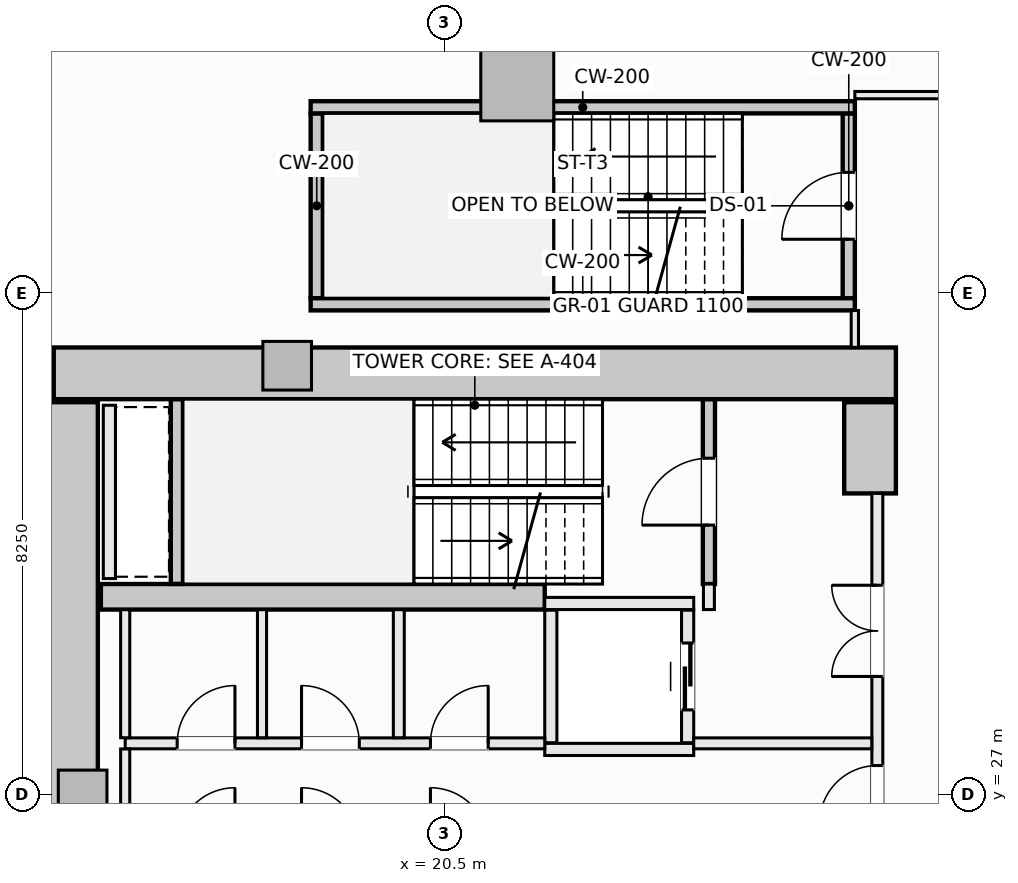
"""IFC4 building model, lengths in metres.
Left out: names, types, materials, properties, quantities, classifications, styles, units other than length and angle.
Written with IfcOpenShell. Run it as: python <this file> out.ifc"""

import sys

from ifc_helpers import new_model, si_unit, direction, frame, frame_2d, origin, origin_2d, place, context, subcontext, project, spatial, rectangle, extrude, element, fill, save


model = new_model("IFC4")
c1 = context("Model", 3, precision=1e-05, world=origin(), true_north=direction((0.0, 1.0)))
c2 = subcontext(c1, "Body", "Model", "MODEL_VIEW")
j1 = project(units=[si_unit("LENGTHUNIT", "METRE"), si_unit("PLANEANGLEUNIT", "RADIAN")], contexts=[c1])
p1 = place(None, origin())
s1 = spatial("IfcSite", under=j1, at=p1, CompositionType="ELEMENT")
p2 = place(p1, origin())
s2 = spatial("IfcBuilding", under=s1, at=p2, CompositionType="ELEMENT")
p3 = place(p2, frame((0.0, 0.0, 49.6)))
s3 = spatial("IfcBuildingStorey", under=s2, at=p3, CompositionType="ELEMENT", Elevation=49.6)
p4 = place(p3, frame((14.075, 33.925, -0.28), z_axis=(0.0, 0.0, 1.0), x_axis=(1.0, 0.0, 0.0)))
e1 = element("IfcWall", 1, at=p4, inside=s3, PredefinedType="SHEAR", context=c2, shape_type="SweptSolid", body=[
    extrude(rectangle(XDim=13.85, YDim=0.85, at=frame_2d((6.925, 0.0))), origin(), (0.0, 0.0, 1.0), 3.85),
])
p5 = place(p3, frame((14.375, 20.55, -0.28), z_axis=(0.0, 0.0, 1.0), x_axis=(0.0, 1.0, 0.0)))
e2 = element("IfcWall", 2, at=p5, inside=s3, PredefinedType="SHEAR", context=c2, shape_type="SweptSolid", body=[
    extrude(rectangle(XDim=12.9, YDim=0.85, at=frame_2d((6.45, 0.0))), origin(), (0.0, 0.0, 1.0), 3.85),
])
p6 = place(p3, frame((27.5, 31.95, -0.28), z_axis=(0.0, 0.0, 1.0), x_axis=(0.0, 1.0, 0.0)))
e3 = element("IfcWall", 3, at=p6, inside=s3, PredefinedType="SHEAR", context=c2, shape_type="SweptSolid", body=[
    extrude(rectangle(XDim=1.5, YDim=0.85, at=frame_2d((0.75, 0.0))), origin(), (0.0, 0.0, 1.0), 3.85),
])
p7 = place(p3, frame((14.85, 30.25, -0.28), z_axis=(0.0, 0.0, 1.0), x_axis=(1.0, 0.0, 0.0)))
e4 = element("IfcWall", 4, at=p7, inside=s3, PredefinedType="SHEAR", context=c2, shape_type="SweptSolid", body=[
    extrude(rectangle(XDim=7.3, YDim=0.42, at=frame_2d((3.65, 0.0))), origin(), (0.0, 0.0, 1.0), 3.85),
])
p8 = place(p3, frame((21.698, 38.677, -0.28), z_axis=(0.0, 0.0, 1.0), x_axis=(1.0, 0.0, 0.0)))
e5 = element("IfcColumn", 5, at=p8, inside=s3, PredefinedType="COLUMN", context=c2, shape_type="SweptSolid", body=[
    extrude(rectangle(XDim=1.2, YDim=1.2, at=origin_2d()), origin(), (0.0, 0.0, 1.0), 3.85),
])
for number, where, z_axis, x_axis in (
    (6, (17.914, 34.05, -0.28), (0.0, 0.0, 1.0), (1.0, 0.0, 0.0)),
    (7, (14.55, 27.0, -0.28), (0.0, 0.0, 1.0), (1.0, 0.0, 0.0)),
):
    element("IfcColumn", number, at=place(p3, frame(where, z_axis=z_axis, x_axis=x_axis)), inside=s3, PredefinedType="PILASTER", context=c2, shape_type="SweptSolid", body=[
        extrude(rectangle(XDim=0.8, YDim=0.8, at=origin_2d()), origin(), (0.0, 0.0, 1.0), 3.85),
    ])
p9 = place(p3, frame((24.85, 30.46, -0.28), z_axis=(0.0, 0.0, 1.0), x_axis=(0.0, 1.0, 0.0)))
e8 = element("IfcWall", 8, at=p9, inside=s3, PredefinedType="SHEAR", context=c2, shape_type="SweptSolid", body=[
    extrude(rectangle(XDim=3.038, YDim=0.2, at=frame_2d((1.519, 0.0))), origin(), (0.0, 0.0, 1.0), 3.85),
])
p10 = place(p9, frame((0.969, 0.0, 0.28)))
e9 = element("IfcOpeningElement", 9, at=p10, cuts=e8, PredefinedType="OPENING", context=c2, shape_type="SweptSolid", body=[
    extrude(rectangle(XDim=1.1, YDim=2.15, at=frame_2d((0.55, 1.075))), frame((0.0, 0.11, 0.0), z_axis=(0.0, -1.0, 0.0), x_axis=(1.0, 0.0, 0.0)), (0.0, 0.0, 1.0), 0.22),
])
p11 = place(p3, frame((16.1, 30.462, -0.28), z_axis=(0.0, 0.0, 1.0), x_axis=(0.0, 1.0, 0.0)))
e10 = element("IfcWall", 10, at=p11, inside=s3, PredefinedType="SHEAR", context=c2, shape_type="SweptSolid", body=[
    extrude(rectangle(XDim=3.036, YDim=0.2, at=frame_2d((1.518, 0.0))), origin(), (0.0, 0.0, 1.0), 3.85),
])
p12 = place(p3, frame((27.15, 35.16, -0.28), z_axis=(0.0, 0.0, 1.0), x_axis=(0.0, 1.0, 0.0)))
e11 = element("IfcWall", 11, at=p12, inside=s3, PredefinedType="SHEAR", context=c2, shape_type="SweptSolid", body=[
    extrude(rectangle(XDim=3.04, YDim=0.2, at=frame_2d((1.52, 0.0))), origin(), (0.0, 0.0, 1.0), 3.85),
])
p13 = place(p12, frame((0.97, 0.0, 0.28)))
e12 = element("IfcOpeningElement", 12, at=p13, cuts=e11, PredefinedType="OPENING", context=c2, shape_type="SweptSolid", body=[
    extrude(rectangle(XDim=1.1, YDim=2.15, at=frame_2d((0.55, 1.075))), frame((0.0, 0.11, 0.0), z_axis=(0.0, -1.0, 0.0), x_axis=(1.0, 0.0, 0.0)), (0.0, 0.0, 1.0), 0.22),
])
p14 = place(p3, frame((18.4, 35.16, -0.28), z_axis=(0.0, 0.0, 1.0), x_axis=(0.0, 1.0, 0.0)))
e13 = element("IfcWall", 13, at=p14, inside=s3, PredefinedType="SHEAR", context=c2, shape_type="SweptSolid", body=[
    extrude(rectangle(XDim=3.04, YDim=0.2, at=frame_2d((1.52, 0.0))), origin(), (0.0, 0.0, 1.0), 3.85),
])
for number, where, z_axis, x_axis in (
    (14, (18.3, 38.3, -0.28), (0.0, 0.0, 1.0), (1.0, 0.0, 0.0)),
    (15, (18.3, 35.06, -0.28), (0.0, 0.0, 1.0), (1.0, 0.0, 0.0)),
):
    element("IfcWall", number, at=place(p3, frame(where, z_axis=z_axis, x_axis=x_axis)), inside=s3, PredefinedType="SHEAR", context=c2, shape_type="SweptSolid", body=[
        extrude(rectangle(XDim=8.95, YDim=0.2, at=frame_2d((4.475, 0.0))), origin(), (0.0, 0.0, 1.0), 3.85),
    ])
for number, where, z_axis, x_axis in (
    (16, (22.15, 30.14, 0.0), (0.0, 0.0, 1.0), (1.0, 0.0, 0.0)),
    (17, (22.15, 27.74, 0.0), (0.0, 0.0, 1.0), (1.0, 0.0, 0.0)),
):
    element("IfcWall", number, at=place(p3, frame(where, z_axis=z_axis, x_axis=x_axis)), inside=s3, PredefinedType="SOLIDWALL", context=c2, shape_type="SweptSolid", body=[
        extrude(rectangle(XDim=2.45, YDim=0.2, at=frame_2d((1.225, 0.0))), origin(), (0.0, 0.0, 1.0), 3.57),
    ])
p15 = place(p3, frame((22.25, 27.85, 0.0), z_axis=(0.0, 0.0, 1.0), x_axis=(0.0, 1.0, 0.0)))
e18 = element("IfcWall", 18, at=p15, inside=s3, PredefinedType="SOLIDWALL", context=c2, shape_type="SweptSolid", body=[
    extrude(rectangle(XDim=2.18, YDim=0.2, at=frame_2d((1.09, 0.0))), origin(), (0.0, 0.0, 1.0), 3.57),
])
p16 = place(p3, frame((24.5, 27.85, 0.0), z_axis=(0.0, 0.0, 1.0), x_axis=(0.0, 1.0, 0.0)))
e19 = element("IfcWall", 19, at=p16, inside=s3, PredefinedType="SOLIDWALL", context=c2, shape_type="SweptSolid", body=[
    extrude(rectangle(XDim=2.18, YDim=0.2, at=frame_2d((1.09, 0.0))), origin(), (0.0, 0.0, 1.0), 3.57),
])
p17 = place(p16, frame((0.54, 0.0, 0.0)))
e20 = element("IfcOpeningElement", 20, at=p17, cuts=e19, PredefinedType="OPENING", context=c2, shape_type="SweptSolid", body=[
    extrude(rectangle(XDim=1.1, YDim=2.2, at=frame_2d((0.55, 1.1))), frame((0.0, 0.11, 0.0), z_axis=(0.0, -1.0, 0.0), x_axis=(1.0, 0.0, 0.0)), (0.0, 0.0, 1.0), 0.22),
])
p18 = place(p3, frame((14.99, 30.55, 0.0), z_axis=(0.0, 0.0, 1.0), x_axis=(0.0, 1.0, 0.0)))
e21 = element("IfcWall", 21, at=p18, inside=s3, PredefinedType="SOLIDWALL", context=c2, shape_type="SweptSolid", body=[
    extrude(rectangle(XDim=2.85, YDim=0.2, at=frame_2d((1.425, 0.0))), origin(), (0.0, 0.0, 1.0), 3.57),
])
p19 = place(p3, frame((24.85, 30.04, 0.0), z_axis=(0.0, 0.0, 1.0), x_axis=(0.0, 1.0, 0.0)))
e22 = element("IfcWall", 22, at=p19, inside=s3, PredefinedType="SOLIDWALL", context=c2, shape_type="SweptSolid", body=[
    extrude(rectangle(XDim=0.42, YDim=0.18, at=frame_2d((0.21, 0.0))), origin(), (0.0, 0.0, 1.0), 3.57),
])
p20 = place(p3, frame((27.62, 22.05, 0.0), z_axis=(0.0, 0.0, 1.0), x_axis=(0.0, 1.0, 0.0)))
e23 = element("IfcWall", 23, at=p20, inside=s3, PredefinedType="SOLIDWALL", context=c2, shape_type="SweptSolid", body=[
    extrude(rectangle(XDim=9.9, YDim=0.18, at=frame_2d((4.95, 0.0))), origin(), (0.0, 0.0, 1.0), 2.662),
])
p21 = place(p20, frame((4.475, 0.0, 0.0)))
e24 = element("IfcOpeningElement", 24, at=p21, cuts=e23, PredefinedType="OPENING", context=c2, shape_type="SweptSolid", body=[
    extrude(rectangle(XDim=0.95, YDim=2.1, at=frame_2d((0.475, 1.05))), frame((0.0, 0.1, 0.0), z_axis=(0.0, -1.0, 0.0), x_axis=(1.0, 0.0, 0.0)), (0.0, 0.0, 1.0), 0.2),
])
p22 = place(p20, frame((6.89, 0.0, 0.0)))
e25 = element("IfcOpeningElement", 25, at=p22, cuts=e23, PredefinedType="OPENING", context=c2, shape_type="SweptSolid", body=[
    extrude(rectangle(XDim=1.5, YDim=2.2, at=frame_2d((0.75, 1.1))), frame((0.0, 0.1, 0.0), z_axis=(0.0, -1.0, 0.0), x_axis=(1.0, 0.0, 0.0)), (0.0, 0.0, 1.0), 0.2),
])
p23 = place(p20, frame((1.51, 0.0, 0.0)))
e26 = element("IfcOpeningElement", 26, at=p23, cuts=e23, PredefinedType="OPENING", context=c2, shape_type="SweptSolid", body=[
    extrude(rectangle(XDim=1.5, YDim=2.2, at=frame_2d((0.75, 1.1))), frame((0.0, 0.1, 0.0), z_axis=(0.0, -1.0, 0.0), x_axis=(1.0, 0.0, 0.0)), (0.0, 0.0, 1.0), 0.2),
])
p24 = place(p3, frame((15.25, 27.84, 0.0), z_axis=(0.0, 0.0, 1.0), x_axis=(1.0, 0.0, 0.0)))
e27 = element("IfcWall", 27, at=p24, inside=s3, PredefinedType="SOLIDWALL", context=c2, shape_type="SweptSolid", body=[
    extrude(rectangle(XDim=6.9, YDim=0.18, at=frame_2d((3.45, 0.0))), origin(), (0.0, 0.0, 1.0), 3.57),
])
p25 = place(p24, frame((5.02, 0.0, 0.0)))
e28 = element("IfcOpeningElement", 28, at=p25, cuts=e27, PredefinedType="OPENING", context=c2, shape_type="SweptSolid", body=[
    extrude(rectangle(XDim=0.95, YDim=2.1, at=frame_2d((0.475, 1.05))), frame((0.0, 0.1, 0.0), z_axis=(0.0, -1.0, 0.0), x_axis=(1.0, 0.0, 0.0)), (0.0, 0.0, 1.0), 0.2),
])
p26 = place(p24, frame((0.855, 0.0, 0.0)))
e29 = element("IfcOpeningElement", 29, at=p26, cuts=e27, PredefinedType="OPENING", context=c2, shape_type="SweptSolid", body=[
    extrude(rectangle(XDim=0.95, YDim=2.1, at=frame_2d((0.475, 1.05))), frame((0.0, 0.1, 0.0), z_axis=(0.0, -1.0, 0.0), x_axis=(1.0, 0.0, 0.0)), (0.0, 0.0, 1.0), 0.2),
])
p27 = place(p24, frame((2.9, 0.0, 0.0)))
e30 = element("IfcOpeningElement", 30, at=p27, cuts=e27, PredefinedType="OPENING", context=c2, shape_type="SweptSolid", body=[
    extrude(rectangle(XDim=0.95, YDim=2.1, at=frame_2d((0.475, 1.05))), frame((0.0, 0.1, 0.0), z_axis=(0.0, -1.0, 0.0), x_axis=(1.0, 0.0, 0.0)), (0.0, 0.0, 1.0), 0.2),
])
p28 = place(p3, frame((24.6, 27.84, 0.0), z_axis=(0.0, 0.0, 1.0), x_axis=(1.0, 0.0, 0.0)))
e31 = element("IfcWall", 31, at=p28, inside=s3, PredefinedType="SOLIDWALL", context=c2, shape_type="SweptSolid", body=[
    extrude(rectangle(XDim=2.928, YDim=0.18, at=frame_2d((1.464, 0.0))), origin(), (0.0, 0.0, 1.0), 3.57),
])
p29 = place(p3, frame((15.25, 26.252, 0.0), z_axis=(0.0, 0.0, 1.0), x_axis=(0.0, 1.0, 0.0)))
e32 = element("IfcWall", 32, at=p29, inside=s3, PredefinedType="PARTITIONING", context=c2, shape_type="SweptSolid", body=[
    extrude(rectangle(XDim=1.496, YDim=0.15, at=frame_2d((0.748, 0.0))), origin(), (0.0, 0.0, 1.0), 3.57),
])
p30 = place(p3, frame((15.25, 27.932, 0.0), z_axis=(0.0, 0.0, 1.0), x_axis=(0.0, 1.0, 0.0)))
e33 = element("IfcWall", 33, at=p30, inside=s3, PredefinedType="PARTITIONING", context=c2, shape_type="SweptSolid", body=[
    extrude(rectangle(XDim=2.106, YDim=0.15, at=frame_2d((1.053, 0.0))), origin(), (0.0, 0.0, 1.0), 3.57),
])
p31 = place(p3, frame((19.75, 27.932, 0.0), z_axis=(0.0, 0.0, 1.0), x_axis=(0.0, 1.0, 0.0)))
e34 = element("IfcWall", 34, at=p31, inside=s3, PredefinedType="SOLIDWALL", context=c2, shape_type="SweptSolid", body=[
    extrude(rectangle(XDim=2.106, YDim=0.18, at=frame_2d((1.053, 0.0))), origin(), (0.0, 0.0, 1.0), 3.57),
])
p32 = place(p3, frame((17.5, 27.932, 0.0), z_axis=(0.0, 0.0, 1.0), x_axis=(0.0, 1.0, 0.0)))
e35 = element("IfcWall", 35, at=p32, inside=s3, PredefinedType="PARTITIONING", context=c2, shape_type="SweptSolid", body=[
    extrude(rectangle(XDim=2.106, YDim=0.15, at=frame_2d((1.053, 0.0))), origin(), (0.0, 0.0, 1.0), 3.57),
])
p33 = place(p3, frame((27.25, 34.352, 0.0), z_axis=(0.0, 0.0, 1.0), x_axis=(0.0, 1.0, 0.0)))
e36 = element("IfcWall", 36, at=p33, inside=s3, PredefinedType="PARTITIONING", context=c2, shape_type="SweptSolid", body=[
    extrude(rectangle(XDim=0.606, YDim=0.12, at=frame_2d((0.303, 0.0))), origin(), (0.0, 0.0, 1.0), 3.57),
])
p34 = place(p3, frame((27.25, 38.5, 0.0), z_axis=(0.0, 0.0, 1.0), x_axis=(1.0, 0.0, 0.0)))
e37 = element("IfcWall", 37, at=p34, inside=s3, PredefinedType="PARTITIONING", context=c2, shape_type="SweptSolid", body=[
    extrude(rectangle(XDim=2.53, YDim=0.12, at=frame_2d((1.265, 0.0))), origin(), (0.0, 0.0, 1.0), 3.57),
])
p35 = place(p10, origin())
e38 = element("IfcDoor", 38, at=p35, inside=s3, OperationType="SINGLE_SWING_LEFT", PredefinedType="DOOR", context=c2, shape_type="SweptSolid", body=[
    extrude(rectangle(XDim=1.1, YDim=2.15, at=frame_2d((0.55, 1.075))), frame((0.0, 0.025, 0.0), z_axis=(0.0, -1.0, 0.0), x_axis=(1.0, 0.0, 0.0)), (0.0, 0.0, 1.0), 0.05),
])
fill(e9, e38)
p36 = place(p13, origin())
e39 = element("IfcDoor", 39, at=p36, inside=s3, OperationType="SINGLE_SWING_LEFT", PredefinedType="DOOR", context=c2, shape_type="SweptSolid", body=[
    extrude(rectangle(XDim=1.1, YDim=2.15, at=frame_2d((0.55, 1.075))), frame((0.0, 0.025, 0.0), z_axis=(0.0, -1.0, 0.0), x_axis=(1.0, 0.0, 0.0)), (0.0, 0.0, 1.0), 0.05),
])
fill(e12, e39)
p37 = place(p17, origin())
e40 = element("IfcDoor", 40, at=p37, inside=s3, OperationType="SLIDING_TO_LEFT", PredefinedType="DOOR", context=c2, shape_type="SweptSolid", body=[
    extrude(rectangle(XDim=1.1, YDim=2.2, at=frame_2d((0.55, 1.1))), frame((0.0, 0.025, 0.0), z_axis=(0.0, -1.0, 0.0), x_axis=(1.0, 0.0, 0.0)), (0.0, 0.0, 1.0), 0.05),
])
fill(e20, e40)
p38 = place(p21, origin())
e41 = element("IfcDoor", 41, at=p38, inside=s3, OperationType="SINGLE_SWING_LEFT", PredefinedType="DOOR", context=c2, shape_type="SweptSolid", body=[
    extrude(rectangle(XDim=0.95, YDim=2.1, at=frame_2d((0.475, 1.05))), frame((0.0, 0.025, 0.0), z_axis=(0.0, -1.0, 0.0), x_axis=(1.0, 0.0, 0.0)), (0.0, 0.0, 1.0), 0.05),
])
fill(e24, e41)
p39 = place(p22, origin())
e42 = element("IfcDoor", 42, at=p39, inside=s3, OperationType="DOUBLE_DOOR_SINGLE_SWING", PredefinedType="DOOR", context=c2, shape_type="SweptSolid", body=[
    extrude(rectangle(XDim=1.5, YDim=2.2, at=frame_2d((0.75, 1.1))), frame((0.0, 0.025, 0.0), z_axis=(0.0, -1.0, 0.0), x_axis=(1.0, 0.0, 0.0)), (0.0, 0.0, 1.0), 0.05),
])
fill(e25, e42)
p40 = place(p25, origin())
e43 = element("IfcDoor", 43, at=p40, inside=s3, OperationType="SINGLE_SWING_RIGHT", PredefinedType="DOOR", context=c2, shape_type="SweptSolid", body=[
    extrude(rectangle(XDim=0.95, YDim=2.1, at=frame_2d((0.475, 1.05))), frame((0.0, 0.025, 0.0), z_axis=(0.0, -1.0, 0.0), x_axis=(1.0, 0.0, 0.0)), (0.0, 0.0, 1.0), 0.05),
])
fill(e28, e43)
p41 = place(p26, origin())
e44 = element("IfcDoor", 44, at=p41, inside=s3, OperationType="SINGLE_SWING_RIGHT", PredefinedType="DOOR", context=c2, shape_type="SweptSolid", body=[
    extrude(rectangle(XDim=0.95, YDim=2.1, at=frame_2d((0.475, 1.05))), frame((0.0, 0.025, 0.0), z_axis=(0.0, -1.0, 0.0), x_axis=(1.0, 0.0, 0.0)), (0.0, 0.0, 1.0), 0.05),
])
fill(e29, e44)
p42 = place(p27, origin())
e45 = element("IfcDoor", 45, at=p42, inside=s3, OperationType="SINGLE_SWING_LEFT", PredefinedType="DOOR", context=c2, shape_type="SweptSolid", body=[
    extrude(rectangle(XDim=0.95, YDim=2.1, at=frame_2d((0.475, 1.05))), frame((0.0, 0.025, 0.0), z_axis=(0.0, -1.0, 0.0), x_axis=(1.0, 0.0, 0.0)), (0.0, 0.0, 1.0), 0.05),
])
fill(e30, e45)
save(model, sys.argv[1])
